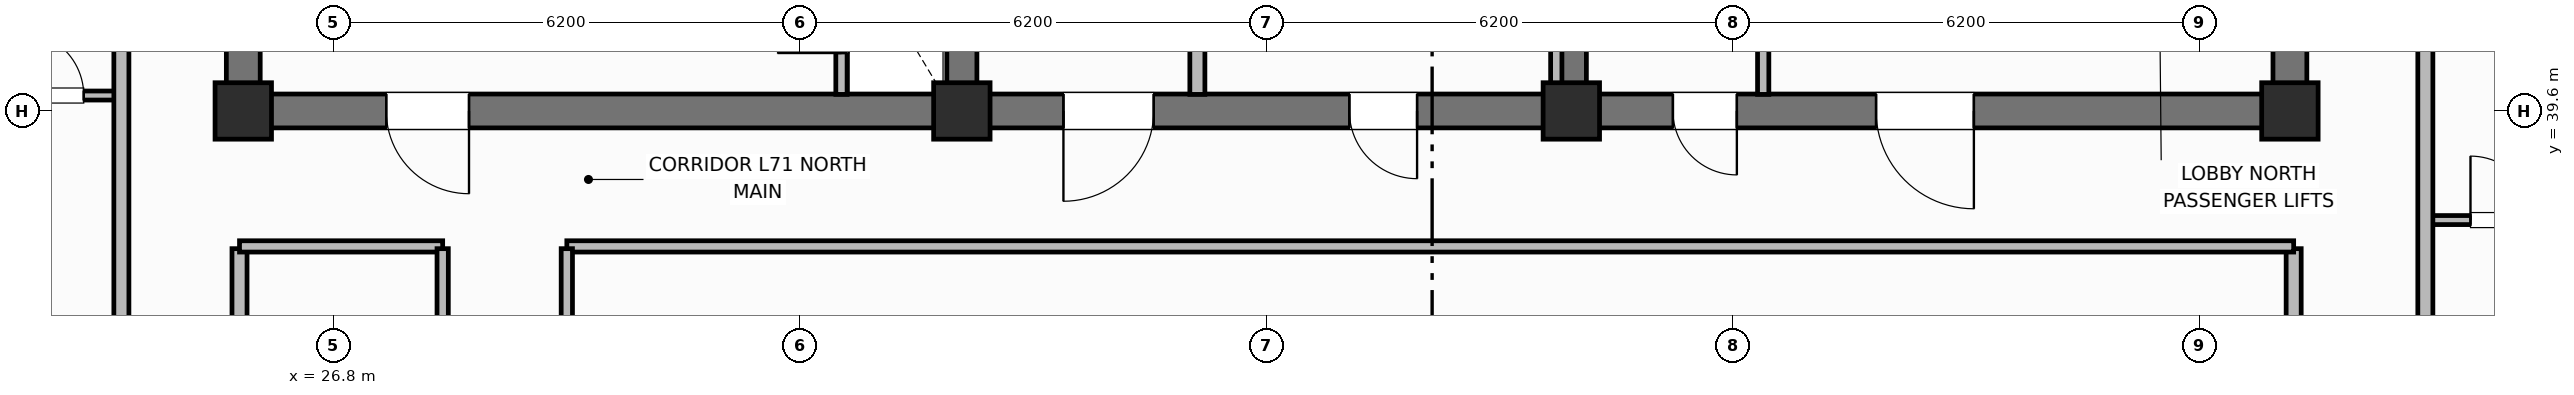
"""IFC4 building model, lengths in metres.
Left out: names, types, materials, properties, quantities, classifications, styles, units other than length and angle.
Written with IfcOpenShell. Run it as: python <this file> out.ifc"""

import sys

from ifc_helpers import new_model, si_unit, direction, frame, frame_2d, origin, origin_2d, place, context, subcontext, project, spatial, rectangle, extrude, element, fill, save


model = new_model("IFC4")
c1 = context("Model", 3, precision=1e-05, world=origin(), true_north=direction((0.0, 1.0)))
c2 = subcontext(c1, "Body", "Model", "MODEL_VIEW")
j1 = project(units=[si_unit("LENGTHUNIT", "METRE"), si_unit("PLANEANGLEUNIT", "RADIAN")], contexts=[c1])
p1 = place(None, origin())
s1 = spatial("IfcSite", under=j1, at=p1, CompositionType="ELEMENT")
p2 = place(p1, origin())
s2 = spatial("IfcBuilding", under=s1, at=p2, CompositionType="ELEMENT")
p3 = place(p2, frame((0.0, 0.0, 282.4)))
s3 = spatial("IfcBuildingStorey", under=s2, at=p3, CompositionType="ELEMENT", Elevation=282.4)
for number, where, z_axis, x_axis in (
    (1, (25.6, 39.825, 0.0), (0.0, 0.0, 1.0), (0.0, 1.0, 0.0)),
    (2, (52.8, 39.825, 0.0), (0.0, 0.0, 1.0), (0.0, 1.0, 0.0)),
):
    element("IfcWall", number, at=place(p3, frame(where, z_axis=z_axis, x_axis=x_axis)), inside=s3, PredefinedType="SHEAR", context=c2, shape_type="SweptSolid", body=[
        extrude(rectangle(XDim=5.75, YDim=0.45, at=frame_2d((2.875, 0.0))), origin(), (0.0, 0.0, 1.0), 3.7),
    ])
p4 = place(p3, frame((52.8, 39.6, 0.0), z_axis=(0.0, 0.0, 1.0), x_axis=(-1.0, 0.0, 0.0)))
e3 = element("IfcWall", 3, at=p4, inside=s3, PredefinedType="SHEAR", context=c2, shape_type="SweptSolid", body=[
    extrude(rectangle(XDim=27.2, YDim=0.45, at=frame_2d((13.6, 0.0))), origin(), (0.0, 0.0, 1.0), 3.7),
])
p5 = place(p4, frame((24.2, 0.0, 0.0)))
e4 = element("IfcOpeningElement", 4, at=p5, cuts=e3, PredefinedType="OPENING", context=c2, shape_type="SweptSolid", body=[
    extrude(rectangle(XDim=1.1, YDim=2.15, at=frame_2d((0.55, 1.075))), frame((0.0, 0.235, 0.0), z_axis=(0.0, -1.0, 0.0), x_axis=(1.0, 0.0, 0.0)), (0.0, 0.0, 1.0), 0.47),
])
p6 = place(p4, frame((15.1, 0.0, 0.0)))
e5 = element("IfcOpeningElement", 5, at=p6, cuts=e3, PredefinedType="OPENING", context=c2, shape_type="SweptSolid", body=[
    extrude(rectangle(XDim=1.2, YDim=2.15, at=frame_2d((0.6, 1.075))), frame((0.0, 0.235, 0.0), z_axis=(0.0, -1.0, 0.0), x_axis=(1.0, 0.0, 0.0)), (0.0, 0.0, 1.0), 0.47),
])
p7 = place(p4, frame((11.6, 0.0, 0.0)))
e6 = element("IfcOpeningElement", 6, at=p7, cuts=e3, PredefinedType="OPENING", context=c2, shape_type="SweptSolid", body=[
    extrude(rectangle(XDim=0.9, YDim=2.1, at=frame_2d((0.45, 1.05))), frame((0.0, 0.235, 0.0), z_axis=(0.0, -1.0, 0.0), x_axis=(1.0, 0.0, 0.0)), (0.0, 0.0, 1.0), 0.47),
])
p8 = place(p4, frame((7.35, 0.0, 0.0)))
e7 = element("IfcOpeningElement", 7, at=p8, cuts=e3, PredefinedType="OPENING", context=c2, shape_type="SweptSolid", body=[
    extrude(rectangle(XDim=0.85, YDim=2.1, at=frame_2d((0.425, 1.05))), frame((0.0, 0.235, 0.0), z_axis=(0.0, -1.0, 0.0), x_axis=(1.0, 0.0, 0.0)), (0.0, 0.0, 1.0), 0.47),
])
p9 = place(p4, frame((4.2, 0.0, 0.0)))
e8 = element("IfcOpeningElement", 8, at=p9, cuts=e3, PredefinedType="OPENING", context=c2, shape_type="SweptSolid", body=[
    extrude(rectangle(XDim=1.3, YDim=2.2, at=frame_2d((0.65, 1.1))), frame((0.0, 0.235, 0.0), z_axis=(0.0, -1.0, 0.0), x_axis=(1.0, 0.0, 0.0)), (0.0, 0.0, 1.0), 0.47),
])
for number, where, z_axis, x_axis in (
    (9, (35.15, 39.825, 0.0), (0.0, 0.0, 1.0), (0.0, 1.0, 0.0)),
    (10, (43.25, 39.825, 0.0), (0.0, 0.0, 1.0), (0.0, 1.0, 0.0)),
):
    element("IfcWall", number, at=place(p3, frame(where, z_axis=z_axis, x_axis=x_axis)), inside=s3, PredefinedType="SHEAR", context=c2, shape_type="SweptSolid", body=[
        extrude(rectangle(XDim=5.75, YDim=0.4, at=frame_2d((2.875, 0.0))), origin(), (0.0, 0.0, 1.0), 3.7),
    ])
for number, where, z_axis, x_axis in (
    (11, (25.6, 39.6, 0.0), (0.0, 0.0, 1.0), (1.0, 0.0, 0.0)),
    (12, (35.15, 39.6, 0.0), (0.0, 0.0, 1.0), (1.0, 0.0, 0.0)),
    (13, (43.25, 39.6, 0.0), (0.0, 0.0, 1.0), (1.0, 0.0, 0.0)),
    (14, (52.8, 39.6, 0.0), (0.0, 0.0, 1.0), (1.0, 0.0, 0.0)),
):
    element("IfcColumn", number, at=place(p3, frame(where, z_axis=z_axis, x_axis=x_axis)), inside=s3, PredefinedType="COLUMN", context=c2, shape_type="SweptSolid", body=[
        extrude(rectangle(XDim=0.75, YDim=0.75, at=origin_2d()), origin(), (0.0, 0.0, 1.0), 3.7),
    ])
p10 = place(p3, frame((33.55, 39.82, 0.0), z_axis=(0.0, 0.0, 1.0), x_axis=(0.0, 1.0, 0.0)))
e15 = element("IfcWall", 15, at=p10, inside=s3, PredefinedType="PARTITIONING", context=c2, shape_type="SweptSolid", body=[
    extrude(rectangle(XDim=2.13, YDim=0.15, at=frame_2d((1.065, 0.0))), origin(), (0.0, 0.0, 1.0), 2.56),
])
p11 = place(p10, frame((0.55, 0.0, 0.0)))
e16 = element("IfcOpeningElement", 16, at=p11, cuts=e15, PredefinedType="OPENING", context=c2, shape_type="SweptSolid", body=[
    extrude(rectangle(XDim=0.85, YDim=2.05, at=frame_2d((0.425, 1.025))), frame((0.0, 0.085, 0.0), z_axis=(0.0, -1.0, 0.0), x_axis=(1.0, 0.0, 0.0)), (0.0, 0.0, 1.0), 0.17),
])
p12 = place(p3, frame((38.28, 39.82, 0.0), z_axis=(0.0, 0.0, 1.0), x_axis=(0.0, 1.0, 0.0)))
e17 = element("IfcWall", 17, at=p12, inside=s3, PredefinedType="PARTITIONING", context=c2, shape_type="SweptSolid", body=[
    extrude(rectangle(XDim=5.63, YDim=0.2, at=frame_2d((2.815, 0.0))), origin(), (0.0, 0.0, 1.0), 2.56),
])
for number, where, z_axis, x_axis in (
    (18, (43.05, 39.82, 0.0), (0.0, 0.0, 1.0), (0.0, 1.0, 0.0)),
    (19, (45.8, 39.82, 0.0), (0.0, 0.0, 1.0), (0.0, 1.0, 0.0)),
):
    element("IfcWall", number, at=place(p3, frame(where, z_axis=z_axis, x_axis=x_axis)), inside=s3, PredefinedType="PARTITIONING", context=c2, shape_type="SweptSolid", body=[
        extrude(rectangle(XDim=5.63, YDim=0.15, at=frame_2d((2.815, 0.0))), origin(), (0.0, 0.0, 1.0), 2.56),
    ])
for number, where, z_axis, x_axis in (
    (20, (25.55, 18.63, 0.0), (0.0, 0.0, 1.0), (0.0, 1.0, 0.0)),
    (21, (52.85, 18.63, 0.0), (0.0, 0.0, 1.0), (0.0, 1.0, 0.0)),
):
    element("IfcWall", number, at=place(p3, frame(where, z_axis=z_axis, x_axis=x_axis)), inside=s3, PredefinedType="PARTITIONING", context=c2, shape_type="SweptSolid", body=[
        extrude(rectangle(XDim=19.14, YDim=0.2, at=frame_2d((9.57, 0.0))), origin(), (0.0, 0.0, 1.0), 2.56),
    ])
p13 = place(p3, frame((25.55, 37.8, 0.0), z_axis=(0.0, 0.0, 1.0), x_axis=(1.0, 0.0, 0.0)))
e22 = element("IfcWall", 22, at=p13, inside=s3, PredefinedType="PARTITIONING", context=c2, shape_type="SweptSolid", body=[
    extrude(rectangle(XDim=2.7, YDim=0.15, at=frame_2d((1.35, 0.0))), origin(), (0.0, 0.0, 1.0), 2.56),
])
p14 = place(p3, frame((29.9, 37.8, 0.0), z_axis=(0.0, 0.0, 1.0), x_axis=(1.0, 0.0, 0.0)))
e23 = element("IfcWall", 23, at=p14, inside=s3, PredefinedType="PARTITIONING", context=c2, shape_type="SweptSolid", body=[
    extrude(rectangle(XDim=22.95, YDim=0.15, at=frame_2d((11.475, 0.0))), origin(), (0.0, 0.0, 1.0), 2.56),
])
p15 = place(p3, frame((28.25, 18.63, 0.0), z_axis=(0.0, 0.0, 1.0), x_axis=(0.0, 1.0, 0.0)))
e24 = element("IfcWall", 24, at=p15, inside=s3, PredefinedType="PARTITIONING", context=c2, shape_type="SweptSolid", body=[
    extrude(rectangle(XDim=19.14, YDim=0.15, at=frame_2d((9.57, 0.0))), origin(), (0.0, 0.0, 1.0), 2.56),
])
p16 = place(p15, frame((3.0, 0.0, 0.0)))
e25 = element("IfcOpeningElement", 25, at=p16, cuts=e24, PredefinedType="OPENING", context=c2, shape_type="SweptSolid", body=[
    extrude(rectangle(XDim=0.9, YDim=2.1, at=frame_2d((0.45, 1.05))), frame((0.0, 0.085, 0.0), z_axis=(0.0, -1.0, 0.0), x_axis=(1.0, 0.0, 0.0)), (0.0, 0.0, 1.0), 0.17),
])
p17 = place(p15, frame((11.5, 0.0, 0.0)))
e26 = element("IfcOpeningElement", 26, at=p17, cuts=e24, PredefinedType="OPENING", context=c2, shape_type="SweptSolid", body=[
    extrude(rectangle(XDim=0.9, YDim=2.1, at=frame_2d((0.45, 1.05))), frame((0.0, 0.085, 0.0), z_axis=(0.0, -1.0, 0.0), x_axis=(1.0, 0.0, 0.0)), (0.0, 0.0, 1.0), 0.17),
])
p18 = place(p3, frame((29.9, 18.63, 0.0), z_axis=(0.0, 0.0, 1.0), x_axis=(0.0, 1.0, 0.0)))
e27 = element("IfcWall", 27, at=p18, inside=s3, PredefinedType="PARTITIONING", context=c2, shape_type="SweptSolid", body=[
    extrude(rectangle(XDim=19.14, YDim=0.15, at=frame_2d((9.57, 0.0))), origin(), (0.0, 0.0, 1.0), 2.56),
])
p19 = place(p18, frame((2.4, 0.0, 0.0)))
e28 = element("IfcOpeningElement", 28, at=p19, cuts=e27, PredefinedType="OPENING", context=c2, shape_type="SweptSolid", body=[
    extrude(rectangle(XDim=1.0, YDim=2.15, at=frame_2d((0.5, 1.075))), frame((0.0, 0.085, 0.0), z_axis=(0.0, -1.0, 0.0), x_axis=(1.0, 0.0, 0.0)), (0.0, 0.0, 1.0), 0.17),
])
p20 = place(p18, frame((8.89, 0.0, 0.0)))
e29 = element("IfcOpeningElement", 29, at=p20, cuts=e27, PredefinedType="OPENING", context=c2, shape_type="SweptSolid", body=[
    extrude(rectangle(XDim=1.0, YDim=2.15, at=frame_2d((0.5, 1.075))), frame((0.0, 0.085, 0.0), z_axis=(0.0, -1.0, 0.0), x_axis=(1.0, 0.0, 0.0)), (0.0, 0.0, 1.0), 0.17),
])
p21 = place(p3, frame((22.03, 39.805, 0.0), z_axis=(0.0, 0.0, 1.0), x_axis=(1.0, 0.0, 0.0)))
e30 = element("IfcWall", 30, at=p21, inside=s3, PredefinedType="PARTITIONING", context=c2, shape_type="SweptSolid", body=[
    extrude(rectangle(XDim=1.95, YDim=0.12, at=frame_2d((0.975, 0.0))), origin(), (0.0, 0.0, 1.0), 2.56),
])
p22 = place(p21, frame((0.6, 0.0, 0.0)))
e31 = element("IfcOpeningElement", 31, at=p22, cuts=e30, PredefinedType="OPENING", context=c2, shape_type="SweptSolid", body=[
    extrude(rectangle(XDim=0.85, YDim=2.1, at=frame_2d((0.425, 1.05))), frame((0.0, 0.07, 0.0), z_axis=(0.0, -1.0, 0.0), x_axis=(1.0, 0.0, 0.0)), (0.0, 0.0, 1.0), 0.14),
])
p23 = place(p3, frame((23.98, 9.95, 0.0), z_axis=(0.0, 0.0, 1.0), x_axis=(0.0, 1.0, 0.0)))
e32 = element("IfcWall", 32, at=p23, inside=s3, PredefinedType="PARTITIONING", context=c2, shape_type="SweptSolid", body=[
    extrude(rectangle(XDim=36.5, YDim=0.2, at=frame_2d((18.25, 0.0))), origin(), (0.0, 0.0, 1.0), 2.56),
])
p24 = place(p23, frame((3.25, 0.0, 0.0)))
e33 = element("IfcOpeningElement", 33, at=p24, cuts=e32, PredefinedType="OPENING", context=c2, shape_type="SweptSolid", body=[
    extrude(rectangle(XDim=1.0, YDim=2.15, at=frame_2d((0.5, 1.075))), frame((0.0, 0.11, 0.0), z_axis=(0.0, -1.0, 0.0), x_axis=(1.0, 0.0, 0.0)), (0.0, 0.0, 1.0), 0.22),
])
p25 = place(p23, frame((13.3, 0.0, 0.0)))
e34 = element("IfcOpeningElement", 34, at=p25, cuts=e32, PredefinedType="OPENING", context=c2, shape_type="SweptSolid", body=[
    extrude(rectangle(XDim=1.0, YDim=2.15, at=frame_2d((0.5, 1.075))), frame((0.0, 0.11, 0.0), z_axis=(0.0, -1.0, 0.0), x_axis=(1.0, 0.0, 0.0)), (0.0, 0.0, 1.0), 0.22),
])
p26 = place(p23, frame((25.005, 0.0, 0.0)))
e35 = element("IfcOpeningElement", 35, at=p26, cuts=e32, PredefinedType="OPENING", context=c2, shape_type="SweptSolid", body=[
    extrude(rectangle(XDim=1.0, YDim=2.15, at=frame_2d((0.5, 1.075))), frame((0.0, 0.11, 0.0), z_axis=(0.0, -1.0, 0.0), x_axis=(1.0, 0.0, 0.0)), (0.0, 0.0, 1.0), 0.22),
])
p27 = place(p3, frame((54.6, 38.15, 0.0), z_axis=(0.0, 0.0, 1.0), x_axis=(1.0, 0.0, 0.0)))
e36 = element("IfcWall", 36, at=p27, inside=s3, PredefinedType="PARTITIONING", context=c2, shape_type="SweptSolid", body=[
    extrude(rectangle(XDim=1.95, YDim=0.12, at=frame_2d((0.975, 0.0))), origin(), (0.0, 0.0, 1.0), 2.56),
])
p28 = place(p27, frame((0.6, 0.0, 0.0)))
e37 = element("IfcOpeningElement", 37, at=p28, cuts=e36, PredefinedType="OPENING", context=c2, shape_type="SweptSolid", body=[
    extrude(rectangle(XDim=0.85, YDim=2.1, at=frame_2d((0.425, 1.05))), frame((0.0, 0.07, 0.0), z_axis=(0.0, -1.0, 0.0), x_axis=(1.0, 0.0, 0.0)), (0.0, 0.0, 1.0), 0.14),
])
p29 = place(p3, frame((54.6, 9.95, 0.0), z_axis=(0.0, 0.0, 1.0), x_axis=(0.0, 1.0, 0.0)))
e38 = element("IfcWall", 38, at=p29, inside=s3, PredefinedType="PARTITIONING", context=c2, shape_type="SweptSolid", body=[
    extrude(rectangle(XDim=36.5, YDim=0.2, at=frame_2d((18.25, 0.0))), origin(), (0.0, 0.0, 1.0), 2.56),
])
p30 = place(p29, frame((3.25, 0.0, 0.0)))
e39 = element("IfcOpeningElement", 39, at=p30, cuts=e38, PredefinedType="OPENING", context=c2, shape_type="SweptSolid", body=[
    extrude(rectangle(XDim=1.0, YDim=2.15, at=frame_2d((0.5, 1.075))), frame((0.0, 0.11, 0.0), z_axis=(0.0, -1.0, 0.0), x_axis=(1.0, 0.0, 0.0)), (0.0, 0.0, 1.0), 0.22),
])
p31 = place(p29, frame((23.5, 0.0, 0.0)))
e40 = element("IfcOpeningElement", 40, at=p31, cuts=e38, PredefinedType="OPENING", context=c2, shape_type="SweptSolid", body=[
    extrude(rectangle(XDim=1.0, YDim=2.15, at=frame_2d((0.5, 1.075))), frame((0.0, 0.11, 0.0), z_axis=(0.0, -1.0, 0.0), x_axis=(1.0, 0.0, 0.0)), (0.0, 0.0, 1.0), 0.22),
])
p32 = place(p11, origin())
e41 = element("IfcDoor", 41, at=p32, inside=s3, OperationType="SINGLE_SWING_LEFT", PredefinedType="TRAPDOOR", context=c2, shape_type="SweptSolid", body=[
    extrude(rectangle(XDim=0.85, YDim=2.05, at=frame_2d((0.425, 1.025))), frame((0.0, 0.025, 0.0), z_axis=(0.0, -1.0, 0.0), x_axis=(1.0, 0.0, 0.0)), (0.0, 0.0, 1.0), 0.05),
])
fill(e16, e41)
p33 = place(p22, origin())
e42 = element("IfcDoor", 42, at=p33, inside=s3, OperationType="SINGLE_SWING_LEFT", PredefinedType="DOOR", context=c2, shape_type="SweptSolid", body=[
    extrude(rectangle(XDim=0.85, YDim=2.1, at=frame_2d((0.425, 1.05))), frame((0.0, 0.025, 0.0), z_axis=(0.0, -1.0, 0.0), x_axis=(1.0, 0.0, 0.0)), (0.0, 0.0, 1.0), 0.05),
])
fill(e31, e42)
p34 = place(p28, origin())
e43 = element("IfcDoor", 43, at=p34, inside=s3, OperationType="SINGLE_SWING_LEFT", PredefinedType="DOOR", context=c2, shape_type="SweptSolid", body=[
    extrude(rectangle(XDim=0.85, YDim=2.1, at=frame_2d((0.425, 1.05))), frame((0.0, 0.025, 0.0), z_axis=(0.0, -1.0, 0.0), x_axis=(1.0, 0.0, 0.0)), (0.0, 0.0, 1.0), 0.05),
])
fill(e37, e43)
p35 = place(p5, origin())
e44 = element("IfcDoor", 44, at=p35, inside=s3, OperationType="SINGLE_SWING_LEFT", PredefinedType="DOOR", context=c2, shape_type="SweptSolid", body=[
    extrude(rectangle(XDim=1.1, YDim=2.15, at=frame_2d((0.55, 1.075))), frame((0.0, 0.025, 0.0), z_axis=(0.0, -1.0, 0.0), x_axis=(1.0, 0.0, 0.0)), (0.0, 0.0, 1.0), 0.05),
])
fill(e4, e44)
p36 = place(p6, origin())
e45 = element("IfcDoor", 45, at=p36, inside=s3, OperationType="SINGLE_SWING_RIGHT", PredefinedType="DOOR", context=c2, shape_type="SweptSolid", body=[
    extrude(rectangle(XDim=1.2, YDim=2.15, at=frame_2d((0.6, 1.075))), frame((0.0, 0.025, 0.0), z_axis=(0.0, -1.0, 0.0), x_axis=(1.0, 0.0, 0.0)), (0.0, 0.0, 1.0), 0.05),
])
fill(e5, e45)
p37 = place(p7, origin())
e46 = element("IfcDoor", 46, at=p37, inside=s3, OperationType="SINGLE_SWING_LEFT", PredefinedType="DOOR", context=c2, shape_type="SweptSolid", body=[
    extrude(rectangle(XDim=0.9, YDim=2.1, at=frame_2d((0.45, 1.05))), frame((0.0, 0.025, 0.0), z_axis=(0.0, -1.0, 0.0), x_axis=(1.0, 0.0, 0.0)), (0.0, 0.0, 1.0), 0.05),
])
fill(e6, e46)
p38 = place(p8, origin())
e47 = element("IfcDoor", 47, at=p38, inside=s3, OperationType="SINGLE_SWING_LEFT", PredefinedType="DOOR", context=c2, shape_type="SweptSolid", body=[
    extrude(rectangle(XDim=0.85, YDim=2.1, at=frame_2d((0.425, 1.05))), frame((0.0, 0.025, 0.0), z_axis=(0.0, -1.0, 0.0), x_axis=(1.0, 0.0, 0.0)), (0.0, 0.0, 1.0), 0.05),
])
fill(e7, e47)
p39 = place(p9, origin())
e48 = element("IfcDoor", 48, at=p39, inside=s3, OperationType="SINGLE_SWING_LEFT", PredefinedType="DOOR", context=c2, shape_type="SweptSolid", body=[
    extrude(rectangle(XDim=1.3, YDim=2.2, at=frame_2d((0.65, 1.1))), frame((0.0, 0.025, 0.0), z_axis=(0.0, -1.0, 0.0), x_axis=(1.0, 0.0, 0.0)), (0.0, 0.0, 1.0), 0.05),
])
fill(e8, e48)
save(model, sys.argv[1])
